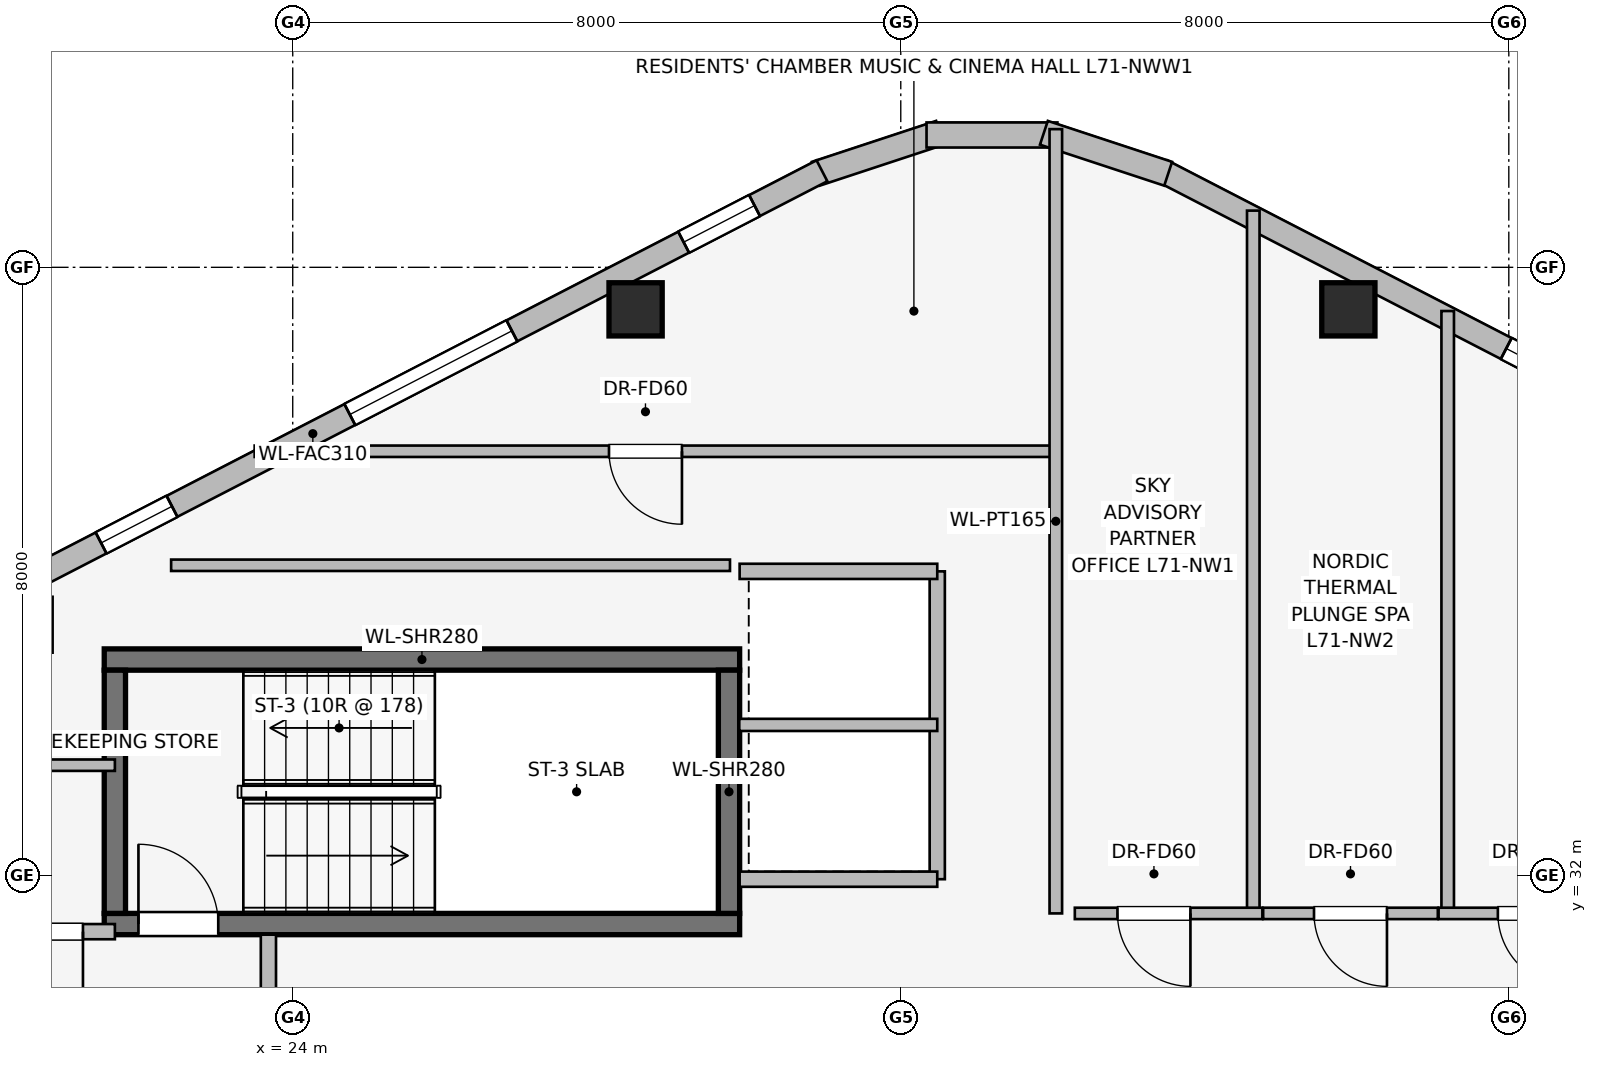
"""IFC4 building model, lengths in metres.
Left out: names, types, materials, properties, quantities, classifications, styles, units other than length and angle.
Written with IfcOpenShell. Run it as: python <this file> out.ifc"""

import sys

from ifc_helpers import new_model, si_unit, direction, frame, frame_2d, origin, origin_2d, place, context, subcontext, project, spatial, rectangle, extrude, element, fill, save


model = new_model("IFC4")
c1 = context("Model", 3, precision=1e-05, world=origin(), true_north=direction((0.0, 1.0)))
c2 = subcontext(c1, "Body", "Model", "MODEL_VIEW")
j1 = project(units=[si_unit("LENGTHUNIT", "METRE"), si_unit("PLANEANGLEUNIT", "RADIAN")], contexts=[c1])
p1 = place(None, origin())
s1 = spatial("IfcSite", under=j1, at=p1, CompositionType="ELEMENT")
p2 = place(p1, origin())
s2 = spatial("IfcBuilding", under=s1, at=p2, CompositionType="ELEMENT")
p3 = place(p2, frame((0.0, 0.0, 259.65)))
s3 = spatial("IfcBuildingStorey", under=s2, at=p3, CompositionType="ELEMENT", Elevation=259.65)
p4 = place(p3, frame((21.52, 31.36, 0.0), z_axis=(0.0, 0.0, 1.0), x_axis=(1.0, 0.0, 0.0)))
e1 = element("IfcWall", 1, at=p4, inside=s3, PredefinedType="SHEAR", context=c2, shape_type="SweptSolid", body=[
    extrude(rectangle(XDim=8.36, YDim=0.28, at=frame_2d((4.18, 0.0))), origin(), (0.0, 0.0, 1.0), 3.55),
])
p5 = place(p4, frame((0.45, 0.0, 0.0)))
e2 = element("IfcOpeningElement", 2, at=p5, cuts=e1, PredefinedType="OPENING", context=c2, shape_type="SweptSolid", body=[
    extrude(rectangle(XDim=1.05, YDim=2.0, at=frame_2d((0.525, 1.0))), frame((0.0, 0.15, 0.0), z_axis=(0.0, -1.0, 0.0), x_axis=(1.0, 0.0, 0.0)), (0.0, 0.0, 1.0), 0.3),
])
p6 = place(p3, frame((29.88, 34.84, 0.0), z_axis=(0.0, 0.0, 1.0), x_axis=(-1.0, 0.0, 0.0)))
e3 = element("IfcWall", 3, at=p6, inside=s3, PredefinedType="SHEAR", context=c2, shape_type="SweptSolid", body=[
    extrude(rectangle(XDim=8.36, YDim=0.28, at=frame_2d((4.18, 0.0))), origin(), (0.0, 0.0, 1.0), 3.55),
])
for number, where, z_axis, x_axis in (
    (4, (21.66, 34.7, 0.0), (0.0, 0.0, 1.0), (0.0, -1.0, 0.0)),
    (5, (29.74, 31.5, 0.0), (0.0, 0.0, 1.0), (0.0, 1.0, 0.0)),
):
    element("IfcWall", number, at=place(p3, frame(where, z_axis=z_axis, x_axis=x_axis)), inside=s3, PredefinedType="SHEAR", context=c2, shape_type="SweptSolid", body=[
        extrude(rectangle(XDim=3.2, YDim=0.28, at=frame_2d((1.6, 0.0))), origin(), (0.0, 0.0, 1.0), 3.55),
    ])
for number, where, z_axis, x_axis in (
    (6, (37.889, 39.447, 0.0), (0.0, 0.0, 1.0), (1.0, 0.0, 0.0)),
    (7, (28.511, 39.447, 0.0), (0.0, 0.0, 1.0), (1.0, 0.0, 0.0)),
):
    element("IfcColumn", number, at=place(p3, frame(where, z_axis=z_axis, x_axis=x_axis)), inside=s3, PredefinedType="COLUMN", context=c2, shape_type="SweptSolid", body=[
        extrude(rectangle(XDim=0.7, YDim=0.7, at=origin_2d()), origin(), (0.0, 0.0, 1.0), 3.55),
    ])
p7 = place(p3, frame((35.437, 41.27, 0.0), z_axis=(0.0, 0.0, 1.0), x_axis=(0.888581481622, -0.458718814218, 0.0)))
e8 = element("IfcWall", 8, at=p7, inside=s3, PredefinedType="STANDARD", context=c2, shape_type="SweptSolid", body=[
    extrude(rectangle(XDim=15.077, YDim=0.31, at=frame_2d((7.539, 0.0))), origin(), (0.0, 0.0, 1.0), 3.29),
])
p8 = place(p7, frame((5.097, 0.0, 0.75)))
e9 = element("IfcOpeningElement", 9, at=p8, cuts=e8, PredefinedType="OPENING", context=c2, shape_type="SweptSolid", body=[
    extrude(rectangle(XDim=2.4, YDim=1.6, at=frame_2d((1.2, 0.8))), frame((0.0, 0.165, 0.0), z_axis=(0.0, -1.0, 0.0), x_axis=(1.0, 0.0, 0.0)), (0.0, 0.0, 1.0), 0.33),
])
p9 = place(p7, frame((8.593, 0.0, 0.75)))
e10 = element("IfcOpeningElement", 10, at=p9, cuts=e8, PredefinedType="OPENING", context=c2, shape_type="SweptSolid", body=[
    extrude(rectangle(XDim=2.4, YDim=1.6, at=frame_2d((1.2, 0.8))), frame((0.0, 0.165, 0.0), z_axis=(0.0, -1.0, 0.0), x_axis=(1.0, 0.0, 0.0)), (0.0, 0.0, 1.0), 0.33),
])
p10 = place(p7, frame((13.029, 0.0, 0.75)))
e11 = element("IfcOpeningElement", 11, at=p10, cuts=e8, PredefinedType="OPENING", context=c2, shape_type="SweptSolid", body=[
    extrude(rectangle(XDim=1.05, YDim=1.4, at=frame_2d((0.525, 0.7))), frame((0.0, 0.165, 0.0), z_axis=(0.0, -1.0, 0.0), x_axis=(1.0, 0.0, 0.0)), (0.0, 0.0, 1.0), 0.33),
])
p11 = place(p3, frame((30.882, 41.231, 0.0), z_axis=(0.0, 0.0, 1.0), x_axis=(0.949713440491, 0.313120393699, 0.0)))
e12 = element("IfcWall", 12, at=p11, inside=s3, PredefinedType="STANDARD", context=c2, shape_type="SweptSolid", body=[
    extrude(rectangle(XDim=1.722, YDim=0.33, at=frame_2d((0.861, 0.0))), origin(), (0.0, 0.0, 1.0), 3.29),
])
p12 = place(p3, frame((32.339, 41.741, 0.0), z_axis=(0.0, 0.0, 1.0), x_axis=(1.0, 0.0, 0.0)))
e13 = element("IfcWall", 13, at=p12, inside=s3, PredefinedType="STANDARD", context=c2, shape_type="SweptSolid", body=[
    extrude(rectangle(XDim=1.722, YDim=0.33, at=frame_2d((0.861, 0.0))), origin(), (0.0, 0.0, 1.0), 3.29),
])
p13 = place(p3, frame((33.883, 41.77, 0.0), z_axis=(0.0, 0.0, 1.0), x_axis=(0.949713440491, -0.313120393699, 0.0)))
e14 = element("IfcWall", 14, at=p13, inside=s3, PredefinedType="STANDARD", context=c2, shape_type="SweptSolid", body=[
    extrude(rectangle(XDim=1.722, YDim=0.33, at=frame_2d((0.861, 0.0))), origin(), (0.0, 0.0, 1.0), 3.29),
])
p14 = place(p3, frame((17.566, 34.354, 0.0), z_axis=(0.0, 0.0, 1.0), x_axis=(0.888581481622, 0.458718814218, 0.0)))
e15 = element("IfcWall", 15, at=p14, inside=s3, PredefinedType="STANDARD", context=c2, shape_type="SweptSolid", body=[
    extrude(rectangle(XDim=15.077, YDim=0.31, at=frame_2d((7.539, 0.0))), origin(), (0.0, 0.0, 1.0), 3.29),
])
p15 = place(p14, frame((0.998, 0.0, 0.75)))
e16 = element("IfcOpeningElement", 16, at=p15, cuts=e15, PredefinedType="OPENING", context=c2, shape_type="SweptSolid", body=[
    extrude(rectangle(XDim=1.05, YDim=1.4, at=frame_2d((0.525, 0.7))), frame((0.0, 0.165, 0.0), z_axis=(0.0, -1.0, 0.0), x_axis=(1.0, 0.0, 0.0)), (0.0, 0.0, 1.0), 0.33),
])
p16 = place(p14, frame((4.403, 0.0, 0.75)))
e17 = element("IfcOpeningElement", 17, at=p16, cuts=e15, PredefinedType="OPENING", context=c2, shape_type="SweptSolid", body=[
    extrude(rectangle(XDim=1.05, YDim=1.4, at=frame_2d((0.525, 0.7))), frame((0.0, 0.165, 0.0), z_axis=(0.0, -1.0, 0.0), x_axis=(1.0, 0.0, 0.0)), (0.0, 0.0, 1.0), 0.33),
])
p17 = place(p14, frame((8.086, 0.0, 0.75)))
e18 = element("IfcOpeningElement", 18, at=p17, cuts=e15, PredefinedType="OPENING", context=c2, shape_type="SweptSolid", body=[
    extrude(rectangle(XDim=2.4, YDim=1.6, at=frame_2d((1.2, 0.8))), frame((0.0, 0.165, 0.0), z_axis=(0.0, -1.0, 0.0), x_axis=(1.0, 0.0, 0.0)), (0.0, 0.0, 1.0), 0.33),
])
p18 = place(p14, frame((13.029, 0.0, 0.75)))
e19 = element("IfcOpeningElement", 19, at=p18, cuts=e15, PredefinedType="OPENING", context=c2, shape_type="SweptSolid", body=[
    extrude(rectangle(XDim=1.05, YDim=1.4, at=frame_2d((0.525, 0.7))), frame((0.0, 0.165, 0.0), z_axis=(0.0, -1.0, 0.0), x_axis=(1.0, 0.0, 0.0)), (0.0, 0.0, 1.0), 0.33),
])
p19 = place(p3, frame((23.68, 25.68, 0.0), z_axis=(0.0, 0.0, 1.0), x_axis=(0.0, 1.0, 0.0)))
e20 = element("IfcWall", 20, at=p19, inside=s3, PredefinedType="PARTITIONING", context=c2, shape_type="SweptSolid", body=[
    extrude(rectangle(XDim=5.54, YDim=0.2, at=frame_2d((2.77, 0.0))), origin(), (0.0, 0.0, 1.0), 3.29),
])
p20 = place(p19, frame((1.8, 0.0, 0.0)))
e21 = element("IfcOpeningElement", 21, at=p20, cuts=e20, PredefinedType="OPENING", context=c2, shape_type="SweptSolid", body=[
    extrude(rectangle(XDim=1.05, YDim=2.0, at=frame_2d((0.525, 1.0))), frame((0.0, 0.11, 0.0), z_axis=(0.0, -1.0, 0.0), x_axis=(1.0, 0.0, 0.0)), (0.0, 0.0, 1.0), 0.22),
])
p21 = place(p3, frame((21.66, 31.26, 0.0), z_axis=(0.0, 0.0, 1.0), x_axis=(-1.0, 0.0, 0.0)))
e22 = element("IfcWall", 22, at=p21, inside=s3, PredefinedType="PARTITIONING", context=c2, shape_type="SweptSolid", body=[
    extrude(rectangle(XDim=2.01, YDim=0.2, at=frame_2d((1.005, 0.0))), origin(), (0.0, 0.0, 1.0), 3.29),
])
p22 = place(p21, frame((0.42, 0.0, 0.0)))
e23 = element("IfcOpeningElement", 23, at=p22, cuts=e22, PredefinedType="OPENING", context=c2, shape_type="SweptSolid", body=[
    extrude(rectangle(XDim=0.86, YDim=2.0, at=frame_2d((0.43, 1.0))), frame((0.0, 0.11, 0.0), z_axis=(0.0, -1.0, 0.0), x_axis=(1.0, 0.0, 0.0)), (0.0, 0.0, 1.0), 0.22),
])
p23 = place(p3, frame((32.48, 31.95, 0.0), z_axis=(0.0, 0.0, 1.0), x_axis=(0.0, 1.0, 0.0)))
e24 = element("IfcWall", 24, at=p23, inside=s3, PredefinedType="PARTITIONING", context=c2, shape_type="SweptSolid", body=[
    extrude(rectangle(XDim=4.05, YDim=0.2, at=frame_2d((2.025, 0.0))), origin(), (0.0, 0.0, 1.0), 3.29),
])
for number, where, z_axis, x_axis in (
    (25, (29.88, 36.0, 0.0), (0.0, 0.0, 1.0), (1.0, 0.0, 0.0)),
    (26, (32.48, 31.95, 0.0), (0.0, 0.0, 1.0), (-1.0, 0.0, 0.0)),
):
    element("IfcWall", number, at=place(p3, frame(where, z_axis=z_axis, x_axis=x_axis)), inside=s3, PredefinedType="PARTITIONING", context=c2, shape_type="SweptSolid", body=[
        extrude(rectangle(XDim=2.6, YDim=0.2, at=frame_2d((1.3, 0.0))), origin(), (0.0, 0.0, 1.0), 3.29),
    ])
p24 = place(p3, frame((29.875, 33.98, 0.0), z_axis=(0.0, 0.0, 1.0), x_axis=(1.0, 0.0, 0.0)))
e27 = element("IfcWall", 27, at=p24, inside=s3, PredefinedType="PARTITIONING", context=c2, shape_type="SweptSolid", body=[
    extrude(rectangle(XDim=2.605, YDim=0.16, at=frame_2d((1.302, 0.0))), origin(), (0.0, 0.0, 1.0), 3.29),
])
p25 = place(p3, frame((21.66, 33.45, 0.0), z_axis=(0.0, 0.0, 1.0), x_axis=(-1.0, 0.0, 0.0)))
e28 = element("IfcWall", 28, at=p25, inside=s3, PredefinedType="PARTITIONING", context=c2, shape_type="SweptSolid", body=[
    extrude(rectangle(XDim=1.81, YDim=0.15, at=frame_2d((0.905, 0.0))), origin(), (0.0, 0.0, 1.0), 3.29),
])
p26 = place(p3, frame((34.0, 37.58, 0.0), z_axis=(0.0, 0.0, 1.0), x_axis=(-1.0, 0.0, 0.0)))
e29 = element("IfcWall", 29, at=p26, inside=s3, PredefinedType="PARTITIONING", context=c2, shape_type="SweptSolid", body=[
    extrude(rectangle(XDim=10.501, YDim=0.15, at=frame_2d((5.25, 0.0))), origin(), (0.0, 0.0, 1.0), 2.682),
])
p27 = place(p26, frame((4.879, 0.0, 0.0)))
e30 = element("IfcOpeningElement", 30, at=p27, cuts=e29, PredefinedType="OPENING", context=c2, shape_type="SweptSolid", body=[
    extrude(rectangle(XDim=0.96, YDim=2.0, at=frame_2d((0.48, 1.0))), frame((0.0, 0.085, 0.0), z_axis=(0.0, -1.0, 0.0), x_axis=(1.0, 0.0, 0.0)), (0.0, 0.0, 1.0), 0.17),
])
p28 = place(p3, frame((34.04, 31.5, 0.0), z_axis=(0.0, 0.0, 1.0), x_axis=(0.0, 1.0, 0.0)))
e31 = element("IfcWall", 31, at=p28, inside=s3, PredefinedType="PARTITIONING", context=c2, shape_type="SweptSolid", body=[
    extrude(rectangle(XDim=10.318, YDim=0.165, at=frame_2d((5.159, 0.0))), origin(), (0.0, 0.0, 1.0), 3.29),
])
p29 = place(p3, frame((36.638, 31.51, 0.0), z_axis=(0.0, 0.0, 1.0), x_axis=(0.0, 1.0, 0.0)))
e32 = element("IfcWall", 32, at=p29, inside=s3, PredefinedType="PARTITIONING", context=c2, shape_type="SweptSolid", body=[
    extrude(rectangle(XDim=9.236, YDim=0.165, at=frame_2d((4.618, 0.0))), origin(), (0.0, 0.0, 1.0), 3.29),
])
p30 = place(p3, frame((39.196, 31.51, 0.0), z_axis=(0.0, 0.0, 1.0), x_axis=(0.0, 1.0, 0.0)))
e33 = element("IfcWall", 33, at=p30, inside=s3, PredefinedType="PARTITIONING", context=c2, shape_type="SweptSolid", body=[
    extrude(rectangle(XDim=7.915, YDim=0.165, at=frame_2d((3.958, 0.0))), origin(), (0.0, 0.0, 1.0), 2.679),
])
p31 = place(p3, frame((36.758, 31.5, 0.0), z_axis=(0.0, 0.0, 1.0), x_axis=(-1.0, 0.0, 0.0)))
e34 = element("IfcWall", 34, at=p31, inside=s3, PredefinedType="PARTITIONING", context=c2, shape_type="SweptSolid", body=[
    extrude(rectangle(XDim=2.468, YDim=0.15, at=frame_2d((1.234, 0.0))), origin(), (0.0, 0.0, 1.0), 3.29),
])
p32 = place(p31, frame((0.947, 0.0, 0.0)))
e35 = element("IfcOpeningElement", 35, at=p32, cuts=e34, PredefinedType="OPENING", context=c2, shape_type="SweptSolid", body=[
    extrude(rectangle(XDim=0.96, YDim=2.0, at=frame_2d((0.48, 1.0))), frame((0.0, 0.085, 0.0), z_axis=(0.0, -1.0, 0.0), x_axis=(1.0, 0.0, 0.0)), (0.0, 0.0, 1.0), 0.17),
])
p33 = place(p3, frame((39.066, 31.5, 0.0), z_axis=(0.0, 0.0, 1.0), x_axis=(-1.0, 0.0, 0.0)))
e36 = element("IfcWall", 36, at=p33, inside=s3, PredefinedType="PARTITIONING", context=c2, shape_type="SweptSolid", body=[
    extrude(rectangle(XDim=2.298, YDim=0.15, at=frame_2d((1.149, 0.0))), origin(), (0.0, 0.0, 1.0), 3.29),
])
p34 = place(p33, frame((0.669, 0.0, 0.0)))
e37 = element("IfcOpeningElement", 37, at=p34, cuts=e36, PredefinedType="OPENING", context=c2, shape_type="SweptSolid", body=[
    extrude(rectangle(XDim=0.96, YDim=2.0, at=frame_2d((0.48, 1.0))), frame((0.0, 0.085, 0.0), z_axis=(0.0, -1.0, 0.0), x_axis=(1.0, 0.0, 0.0)), (0.0, 0.0, 1.0), 0.17),
])
p35 = place(p3, frame((41.45, 31.5, 0.0), z_axis=(0.0, 0.0, 1.0), x_axis=(-1.0, 0.0, 0.0)))
e38 = element("IfcWall", 38, at=p35, inside=s3, PredefinedType="PARTITIONING", context=c2, shape_type="SweptSolid", body=[
    extrude(rectangle(XDim=2.374, YDim=0.15, at=frame_2d((1.187, 0.0))), origin(), (0.0, 0.0, 1.0), 3.29),
])
p36 = place(p35, frame((0.634, 0.0, 0.0)))
e39 = element("IfcOpeningElement", 39, at=p36, cuts=e38, PredefinedType="OPENING", context=c2, shape_type="SweptSolid", body=[
    extrude(rectangle(XDim=0.96, YDim=2.0, at=frame_2d((0.48, 1.0))), frame((0.0, 0.085, 0.0), z_axis=(0.0, -1.0, 0.0), x_axis=(1.0, 0.0, 0.0)), (0.0, 0.0, 1.0), 0.17),
])
p37 = place(p3, frame((29.753, 36.08, 0.0), z_axis=(0.0, 0.0, 1.0), x_axis=(-1.0, 0.0, 0.0)))
e40 = element("IfcWall", 40, at=p37, inside=s3, PredefinedType="PARTITIONING", context=c2, shape_type="SweptSolid", body=[
    extrude(rectangle(XDim=7.353, YDim=0.15, at=frame_2d((3.677, 0.0))), origin(), (0.0, 0.0, 1.0), 2.682),
])
p38 = place(p8, origin())
e41 = element("IfcWindow", 41, at=p38, inside=s3, PartitioningType="SINGLE_PANEL", PredefinedType="WINDOW", context=c2, shape_type="SweptSolid", body=[
    extrude(rectangle(XDim=2.4, YDim=1.6, at=frame_2d((1.2, 0.8))), frame((0.0, 0.03, 0.0), z_axis=(0.0, -1.0, 0.0), x_axis=(1.0, 0.0, 0.0)), (0.0, 0.0, 1.0), 0.06),
])
fill(e9, e41)
p39 = place(p16, origin())
e42 = element("IfcWindow", 42, at=p39, inside=s3, PartitioningType="SINGLE_PANEL", PredefinedType="WINDOW", context=c2, shape_type="SweptSolid", body=[
    extrude(rectangle(XDim=1.05, YDim=1.4, at=frame_2d((0.525, 0.7))), frame((0.0, 0.03, 0.0), z_axis=(0.0, -1.0, 0.0), x_axis=(1.0, 0.0, 0.0)), (0.0, 0.0, 1.0), 0.06),
])
fill(e17, e42)
p40 = place(p17, origin())
e43 = element("IfcWindow", 43, at=p40, inside=s3, PartitioningType="SINGLE_PANEL", PredefinedType="WINDOW", context=c2, shape_type="SweptSolid", body=[
    extrude(rectangle(XDim=2.4, YDim=1.6, at=frame_2d((1.2, 0.8))), frame((0.0, 0.03, 0.0), z_axis=(0.0, -1.0, 0.0), x_axis=(1.0, 0.0, 0.0)), (0.0, 0.0, 1.0), 0.06),
])
fill(e18, e43)
p41 = place(p18, origin())
e44 = element("IfcWindow", 44, at=p41, inside=s3, PartitioningType="SINGLE_PANEL", PredefinedType="WINDOW", context=c2, shape_type="SweptSolid", body=[
    extrude(rectangle(XDim=1.05, YDim=1.4, at=frame_2d((0.525, 0.7))), frame((0.0, 0.03, 0.0), z_axis=(0.0, -1.0, 0.0), x_axis=(1.0, 0.0, 0.0)), (0.0, 0.0, 1.0), 0.06),
])
fill(e19, e44)
p42 = place(p5, origin())
e45 = element("IfcDoor", 45, at=p42, inside=s3, OperationType="SINGLE_SWING_LEFT", PredefinedType="DOOR", context=c2, shape_type="SweptSolid", body=[
    extrude(rectangle(XDim=1.05, YDim=2.0, at=frame_2d((0.525, 1.0))), frame((0.0, 0.025, 0.0), z_axis=(0.0, -1.0, 0.0), x_axis=(1.0, 0.0, 0.0)), (0.0, 0.0, 1.0), 0.05),
])
fill(e2, e45)
p43 = place(p22, origin())
e46 = element("IfcDoor", 46, at=p43, inside=s3, OperationType="SINGLE_SWING_LEFT", PredefinedType="DOOR", context=c2, shape_type="SweptSolid", body=[
    extrude(rectangle(XDim=0.86, YDim=2.0, at=frame_2d((0.43, 1.0))), frame((0.0, 0.025, 0.0), z_axis=(0.0, -1.0, 0.0), x_axis=(1.0, 0.0, 0.0)), (0.0, 0.0, 1.0), 0.05),
])
fill(e23, e46)
p44 = place(p27, origin())
e47 = element("IfcDoor", 47, at=p44, inside=s3, OperationType="SINGLE_SWING_LEFT", PredefinedType="DOOR", context=c2, shape_type="SweptSolid", body=[
    extrude(rectangle(XDim=0.96, YDim=2.0, at=frame_2d((0.48, 1.0))), frame((0.0, 0.025, 0.0), z_axis=(0.0, -1.0, 0.0), x_axis=(1.0, 0.0, 0.0)), (0.0, 0.0, 1.0), 0.05),
])
fill(e30, e47)
p45 = place(p32, origin())
e48 = element("IfcDoor", 48, at=p45, inside=s3, OperationType="SINGLE_SWING_LEFT", PredefinedType="DOOR", context=c2, shape_type="SweptSolid", body=[
    extrude(rectangle(XDim=0.96, YDim=2.0, at=frame_2d((0.48, 1.0))), frame((0.0, 0.025, 0.0), z_axis=(0.0, -1.0, 0.0), x_axis=(1.0, 0.0, 0.0)), (0.0, 0.0, 1.0), 0.05),
])
fill(e35, e48)
p46 = place(p34, origin())
e49 = element("IfcDoor", 49, at=p46, inside=s3, OperationType="SINGLE_SWING_LEFT", PredefinedType="DOOR", context=c2, shape_type="SweptSolid", body=[
    extrude(rectangle(XDim=0.96, YDim=2.0, at=frame_2d((0.48, 1.0))), frame((0.0, 0.025, 0.0), z_axis=(0.0, -1.0, 0.0), x_axis=(1.0, 0.0, 0.0)), (0.0, 0.0, 1.0), 0.05),
])
fill(e37, e49)
p47 = place(p36, origin())
e50 = element("IfcDoor", 50, at=p47, inside=s3, OperationType="SINGLE_SWING_LEFT", PredefinedType="DOOR", context=c2, shape_type="SweptSolid", body=[
    extrude(rectangle(XDim=0.96, YDim=2.0, at=frame_2d((0.48, 1.0))), frame((0.0, 0.025, 0.0), z_axis=(0.0, -1.0, 0.0), x_axis=(1.0, 0.0, 0.0)), (0.0, 0.0, 1.0), 0.05),
])
fill(e39, e50)
save(model, sys.argv[1])
